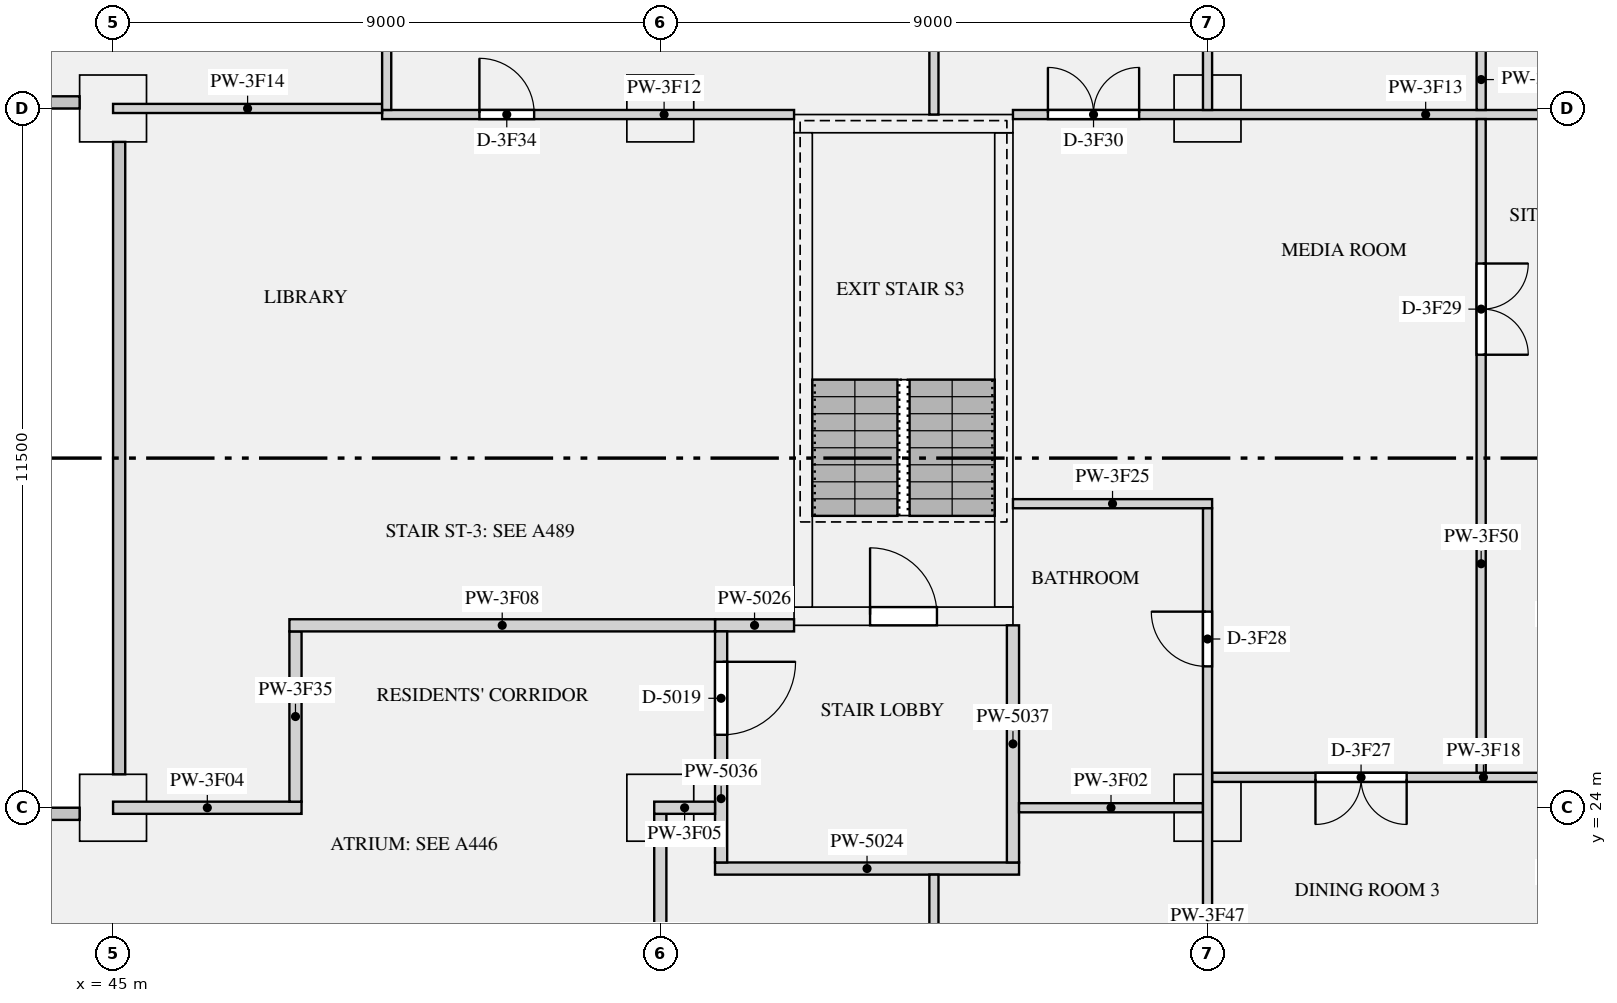
"""IFC4 building model, lengths in metres.
Left out: names, types, materials, properties, quantities, classifications, styles, units other than length and angle.
Written with IfcOpenShell. Run it as: python <this file> out.ifc"""

import sys

from ifc_helpers import new_model, si_unit, direction, frame, frame_2d, origin, origin_2d, place, context, subcontext, project, spatial, rectangle, extrude, element, fill, save


model = new_model("IFC4")
c1 = context("Model", 3, precision=1e-05, world=origin(), true_north=direction((0.0, 1.0)))
c2 = subcontext(c1, "Body", "Model", "MODEL_VIEW")
j1 = project(units=[si_unit("LENGTHUNIT", "METRE"), si_unit("PLANEANGLEUNIT", "RADIAN")], contexts=[c1])
p1 = place(None, origin())
s1 = spatial("IfcSite", under=j1, at=p1, CompositionType="ELEMENT")
p2 = place(p1, origin())
s2 = spatial("IfcBuilding", under=s1, at=p2, CompositionType="ELEMENT")
p3 = place(p2, frame((0.0, 0.0, 179.1)))
s3 = spatial("IfcBuildingStorey", under=s2, at=p3, CompositionType="ELEMENT", Elevation=179.1)
for number, where, z_axis, x_axis in (
    (1, (45.0, 24.0, 0.0), (0.0, 0.0, 1.0), (1.0, 0.0, 0.0)),
    (2, (54.0, 24.0, 0.0), (0.0, 0.0, 1.0), (1.0, 0.0, 0.0)),
    (3, (63.0, 24.0, 0.0), (0.0, 0.0, 1.0), (1.0, 0.0, 0.0)),
    (4, (45.0, 35.5, 0.0), (0.0, 0.0, 1.0), (1.0, 0.0, 0.0)),
    (5, (54.0, 35.5, 0.0), (0.0, 0.0, 1.0), (1.0, 0.0, 0.0)),
    (6, (63.0, 35.5, 0.0), (0.0, 0.0, 1.0), (1.0, 0.0, 0.0)),
):
    element("IfcColumn", number, at=place(p3, frame(where, z_axis=z_axis, x_axis=x_axis)), inside=s3, PredefinedType="COLUMN", context=c2, shape_type="SweptSolid", body=[
        extrude(rectangle(XDim=1.1, YDim=1.1, at=origin_2d()), origin(), (0.0, 0.0, 1.0), 3.15),
    ])
p4 = place(p3, frame((56.2, 27.15, 0.0), z_axis=(0.0, 0.0, 1.0), x_axis=(1.0, 0.0, 0.0)))
e7 = element("IfcWall", 7, at=p4, inside=s3, PredefinedType="SHEAR", context=c2, shape_type="SweptSolid", body=[
    extrude(rectangle(XDim=3.6, YDim=0.3, at=frame_2d((1.8, 0.0))), origin(), (0.0, 0.0, 1.0), 3.15),
])
p5 = place(p4, frame((1.25, 0.0, 0.0)))
e8 = element("IfcOpeningElement", 8, at=p5, cuts=e7, PredefinedType="OPENING", context=c2, shape_type="SweptSolid", body=[
    extrude(rectangle(XDim=1.1, YDim=2.1, at=frame_2d((0.55, 1.05))), frame((0.0, 0.16, 0.0), z_axis=(0.0, -1.0, 0.0), x_axis=(1.0, 0.0, 0.0)), (0.0, 0.0, 1.0), 0.32),
])
p6 = place(p3, frame((56.2, 35.25, 0.0), z_axis=(0.0, 0.0, 1.0), x_axis=(1.0, 0.0, 0.0)))
e9 = element("IfcWall", 9, at=p6, inside=s3, PredefinedType="SHEAR", context=c2, shape_type="SweptSolid", body=[
    extrude(rectangle(XDim=3.6, YDim=0.3, at=frame_2d((1.8, 0.0))), origin(), (0.0, 0.0, 1.0), 3.15),
])
for number, where, z_axis, x_axis in (
    (10, (56.35, 27.3, 0.0), (0.0, 0.0, 1.0), (0.0, 1.0, 0.0)),
    (11, (59.65, 27.3, 0.0), (0.0, 0.0, 1.0), (0.0, 1.0, 0.0)),
):
    element("IfcWall", number, at=place(p3, frame(where, z_axis=z_axis, x_axis=x_axis)), inside=s3, PredefinedType="SHEAR", context=c2, shape_type="SweptSolid", body=[
        extrude(rectangle(XDim=7.8, YDim=0.3, at=frame_2d((3.9, 0.0))), origin(), (0.0, 0.0, 1.0), 3.15),
    ])
p7 = place(p3, frame((54.9, 23.0, 0.0), z_axis=(0.0, 0.0, 1.0), x_axis=(1.0, 0.0, 0.0)))
e12 = element("IfcWall", 12, at=p7, inside=s3, PredefinedType="PARTITIONING", context=c2, shape_type="SweptSolid", body=[
    extrude(rectangle(XDim=5.0, YDim=0.2, at=frame_2d((2.5, 0.0))), origin(), (0.0, 0.0, 1.0), 2.83),
])
p8 = place(p3, frame((54.9, 27.0, 0.0), z_axis=(0.0, 0.0, 1.0), x_axis=(1.0, 0.0, 0.0)))
e13 = element("IfcWall", 13, at=p8, inside=s3, PredefinedType="PARTITIONING", context=c2, shape_type="SweptSolid", body=[
    extrude(rectangle(XDim=1.3, YDim=0.2, at=frame_2d((0.65, 0.0))), origin(), (0.0, 0.0, 1.0), 2.83),
])
p9 = place(p3, frame((55.0, 23.1, 0.0), z_axis=(0.0, 0.0, 1.0), x_axis=(0.0, 1.0, 0.0)))
e14 = element("IfcWall", 14, at=p9, inside=s3, PredefinedType="PARTITIONING", context=c2, shape_type="SweptSolid", body=[
    extrude(rectangle(XDim=3.8, YDim=0.2, at=frame_2d((1.9, 0.0))), origin(), (0.0, 0.0, 1.0), 2.83),
])
p10 = place(p9, frame((2.1, 0.0, 0.0)))
e15 = element("IfcOpeningElement", 15, at=p10, cuts=e14, PredefinedType="OPENING", context=c2, shape_type="SweptSolid", body=[
    extrude(rectangle(XDim=1.2, YDim=2.1, at=frame_2d((0.6, 1.05))), frame((0.0, 0.11, 0.0), z_axis=(0.0, -1.0, 0.0), x_axis=(1.0, 0.0, 0.0)), (0.0, 0.0, 1.0), 0.22),
])
p11 = place(p3, frame((59.8, 23.1, 0.0), z_axis=(0.0, 0.0, 1.0), x_axis=(0.0, 1.0, 0.0)))
e16 = element("IfcWall", 16, at=p11, inside=s3, PredefinedType="PARTITIONING", context=c2, shape_type="SweptSolid", body=[
    extrude(rectangle(XDim=3.9, YDim=0.2, at=frame_2d((1.95, 0.0))), origin(), (0.0, 0.0, 1.0), 2.83),
])
p12 = place(p3, frame((59.9, 24.0, 0.0), z_axis=(0.0, 0.0, 1.0), x_axis=(1.0, 0.0, 0.0)))
e17 = element("IfcWall", 17, at=p12, inside=s3, PredefinedType="PARTITIONING", context=c2, shape_type="SweptSolid", body=[
    extrude(rectangle(XDim=3.025, YDim=0.15, at=frame_2d((1.513, 0.0))), origin(), (0.0, 0.0, 1.0), 2.83),
])
p13 = place(p3, frame((45.0, 24.0, 0.0), z_axis=(0.0, 0.0, 1.0), x_axis=(1.0, 0.0, 0.0)))
e18 = element("IfcWall", 18, at=p13, inside=s3, PredefinedType="PARTITIONING", context=c2, shape_type="SweptSolid", body=[
    extrude(rectangle(XDim=3.1, YDim=0.2, at=frame_2d((1.55, 0.0))), origin(), (0.0, 0.0, 1.0), 2.83),
])
p14 = place(p3, frame((53.9, 24.0, 0.0), z_axis=(0.0, 0.0, 1.0), x_axis=(1.0, 0.0, 0.0)))
e19 = element("IfcWall", 19, at=p14, inside=s3, PredefinedType="PARTITIONING", context=c2, shape_type="SweptSolid", body=[
    extrude(rectangle(XDim=1.0, YDim=0.2, at=frame_2d((0.5, 0.0))), origin(), (0.0, 0.0, 1.0), 2.83),
])
p15 = place(p3, frame((47.9, 27.0, 0.0), z_axis=(0.0, 0.0, 1.0), x_axis=(1.0, 0.0, 0.0)))
e20 = element("IfcWall", 20, at=p15, inside=s3, PredefinedType="PARTITIONING", context=c2, shape_type="SweptSolid", body=[
    extrude(rectangle(XDim=7.0, YDim=0.2, at=frame_2d((3.5, 0.0))), origin(), (0.0, 0.0, 1.0), 2.83),
])
p16 = place(p3, frame((49.425, 35.4, 0.0), z_axis=(0.0, 0.0, 1.0), x_axis=(1.0, 0.0, 0.0)))
e21 = element("IfcWall", 21, at=p16, inside=s3, PredefinedType="PARTITIONING", context=c2, shape_type="SweptSolid", body=[
    extrude(rectangle(XDim=6.775, YDim=0.15, at=frame_2d((3.387, 0.0))), origin(), (0.0, 0.0, 1.0), 2.83),
])
p17 = place(p16, frame((1.6, 0.0, 0.0)))
e22 = element("IfcOpeningElement", 22, at=p17, cuts=e21, PredefinedType="OPENING", context=c2, shape_type="SweptSolid", body=[
    extrude(rectangle(XDim=0.9, YDim=2.1, at=frame_2d((0.45, 1.05))), frame((0.0, 0.085, 0.0), z_axis=(0.0, -1.0, 0.0), x_axis=(1.0, 0.0, 0.0)), (0.0, 0.0, 1.0), 0.17),
])
p18 = place(p3, frame((59.8, 35.4, 0.0), z_axis=(0.0, 0.0, 1.0), x_axis=(1.0, 0.0, 0.0)))
e23 = element("IfcWall", 23, at=p18, inside=s3, PredefinedType="PARTITIONING", context=c2, shape_type="SweptSolid", body=[
    extrude(rectangle(XDim=11.5, YDim=0.15, at=frame_2d((5.75, 0.0))), origin(), (0.0, 0.0, 1.0), 2.83),
])
p19 = place(p18, frame((0.575, 0.0, 0.0)))
e24 = element("IfcOpeningElement", 24, at=p19, cuts=e23, PredefinedType="OPENING", context=c2, shape_type="SweptSolid", body=[
    extrude(rectangle(XDim=1.5, YDim=2.1, at=frame_2d((0.75, 1.05))), frame((0.0, 0.085, 0.0), z_axis=(0.0, -1.0, 0.0), x_axis=(1.0, 0.0, 0.0)), (0.0, 0.0, 1.0), 0.17),
])
p20 = place(p3, frame((45.0, 35.5, 0.0), z_axis=(0.0, 0.0, 1.0), x_axis=(1.0, 0.0, 0.0)))
e25 = element("IfcWall", 25, at=p20, inside=s3, PredefinedType="PARTITIONING", context=c2, shape_type="SweptSolid", body=[
    extrude(rectangle(XDim=4.425, YDim=0.15, at=frame_2d((2.212, 0.0))), origin(), (0.0, 0.0, 1.0), 2.83),
])
p21 = place(p3, frame((63.075, 24.5, 0.0), z_axis=(0.0, 0.0, 1.0), x_axis=(1.0, 0.0, 0.0)))
e26 = element("IfcWall", 26, at=p21, inside=s3, PredefinedType="PARTITIONING", context=c2, shape_type="SweptSolid", body=[
    extrude(rectangle(XDim=5.725, YDim=0.15, at=frame_2d((2.863, 0.0))), origin(), (0.0, 0.0, 1.0), 2.83),
])
p22 = place(p21, frame((1.7, 0.0, 0.0)))
e27 = element("IfcOpeningElement", 27, at=p22, cuts=e26, PredefinedType="OPENING", context=c2, shape_type="SweptSolid", body=[
    extrude(rectangle(XDim=1.5, YDim=2.1, at=frame_2d((0.75, 1.05))), frame((0.0, 0.085, 0.0), z_axis=(0.0, -1.0, 0.0), x_axis=(1.0, 0.0, 0.0)), (0.0, 0.0, 1.0), 0.17),
])
p23 = place(p3, frame((59.8, 29.0, 0.0), z_axis=(0.0, 0.0, 1.0), x_axis=(1.0, 0.0, 0.0)))
e28 = element("IfcWall", 28, at=p23, inside=s3, PredefinedType="PARTITIONING", context=c2, shape_type="SweptSolid", body=[
    extrude(rectangle(XDim=3.275, YDim=0.15, at=frame_2d((1.637, 0.0))), origin(), (0.0, 0.0, 1.0), 2.83),
])
p24 = place(p3, frame((54.0, 16.1, 0.0), z_axis=(0.0, 0.0, 1.0), x_axis=(0.0, 1.0, 0.0)))
e29 = element("IfcWall", 29, at=p24, inside=s3, PredefinedType="PARTITIONING", context=c2, shape_type="SweptSolid", body=[
    extrude(rectangle(XDim=7.8, YDim=0.2, at=frame_2d((3.9, 0.0))), origin(), (0.0, 0.0, 1.0), 2.83),
])
p25 = place(p24, frame((1.85, 0.0, 0.0)))
e30 = element("IfcOpeningElement", 30, at=p25, cuts=e29, PredefinedType="OPENING", context=c2, shape_type="SweptSolid", body=[
    extrude(rectangle(XDim=1.1, YDim=2.1, at=frame_2d((0.55, 1.05))), frame((0.0, 0.11, 0.0), z_axis=(0.0, -1.0, 0.0), x_axis=(1.0, 0.0, 0.0)), (0.0, 0.0, 1.0), 0.22),
])
p26 = place(p3, frame((48.0, 24.1, 0.0), z_axis=(0.0, 0.0, 1.0), x_axis=(0.0, 1.0, 0.0)))
e31 = element("IfcWall", 31, at=p26, inside=s3, PredefinedType="PARTITIONING", context=c2, shape_type="SweptSolid", body=[
    extrude(rectangle(XDim=2.8, YDim=0.2, at=frame_2d((1.4, 0.0))), origin(), (0.0, 0.0, 1.0), 2.83),
])
p27 = place(p3, frame((58.5, 12.575, 0.0), z_axis=(0.0, 0.0, 1.0), x_axis=(0.0, 1.0, 0.0)))
e32 = element("IfcWall", 32, at=p27, inside=s3, PredefinedType="PARTITIONING", context=c2, shape_type="SweptSolid", body=[
    extrude(rectangle(XDim=10.325, YDim=0.15, at=frame_2d((5.163, 0.0))), origin(), (0.0, 0.0, 1.0), 2.83),
])
p28 = place(p27, frame((4.75, 0.0, 0.0)))
e33 = element("IfcOpeningElement", 33, at=p28, cuts=e32, PredefinedType="OPENING", context=c2, shape_type="SweptSolid", body=[
    extrude(rectangle(XDim=0.9, YDim=2.1, at=frame_2d((0.45, 1.05))), frame((0.0, 0.085, 0.0), z_axis=(0.0, -1.0, 0.0), x_axis=(1.0, 0.0, 0.0)), (0.0, 0.0, 1.0), 0.17),
])
p29 = place(p3, frame((58.5, 35.4, 0.0), z_axis=(0.0, 0.0, 1.0), x_axis=(0.0, 1.0, 0.0)))
e34 = element("IfcWall", 34, at=p29, inside=s3, PredefinedType="PARTITIONING", context=c2, shape_type="SweptSolid", body=[
    extrude(rectangle(XDim=7.4, YDim=0.15, at=frame_2d((3.7, 0.0))), origin(), (0.0, 0.0, 1.0), 2.83),
])
p30 = place(p29, frame((3.025, 0.0, 0.0)))
e35 = element("IfcOpeningElement", 35, at=p30, cuts=e34, PredefinedType="OPENING", context=c2, shape_type="SweptSolid", body=[
    extrude(rectangle(XDim=1.5, YDim=2.1, at=frame_2d((0.75, 1.05))), frame((0.0, 0.085, 0.0), z_axis=(0.0, -1.0, 0.0), x_axis=(1.0, 0.0, 0.0)), (0.0, 0.0, 1.0), 0.17),
])
p31 = place(p3, frame((63.0, 12.575, 0.0), z_axis=(0.0, 0.0, 1.0), x_axis=(0.0, 1.0, 0.0)))
e36 = element("IfcWall", 36, at=p31, inside=s3, PredefinedType="PARTITIONING", context=c2, shape_type="SweptSolid", body=[
    extrude(rectangle(XDim=16.35, YDim=0.15, at=frame_2d((8.175, 0.0))), origin(), (0.0, 0.0, 1.0), 2.83),
])
p32 = place(p31, frame((3.75, 0.0, 0.0)))
e37 = element("IfcOpeningElement", 37, at=p32, cuts=e36, PredefinedType="OPENING", context=c2, shape_type="SweptSolid", body=[
    extrude(rectangle(XDim=0.9, YDim=2.1, at=frame_2d((0.45, 1.05))), frame((0.0, 0.085, 0.0), z_axis=(0.0, -1.0, 0.0), x_axis=(1.0, 0.0, 0.0)), (0.0, 0.0, 1.0), 0.17),
])
p33 = place(p31, frame((13.75, 0.0, 0.0)))
e38 = element("IfcOpeningElement", 38, at=p33, cuts=e36, PredefinedType="OPENING", context=c2, shape_type="SweptSolid", body=[
    extrude(rectangle(XDim=0.9, YDim=2.1, at=frame_2d((0.45, 1.05))), frame((0.0, 0.085, 0.0), z_axis=(0.0, -1.0, 0.0), x_axis=(1.0, 0.0, 0.0)), (0.0, 0.0, 1.0), 0.17),
])
p34 = place(p3, frame((63.0, 35.475, 0.0), z_axis=(0.0, 0.0, 1.0), x_axis=(0.0, 1.0, 0.0)))
e39 = element("IfcWall", 39, at=p34, inside=s3, PredefinedType="PARTITIONING", context=c2, shape_type="SweptSolid", body=[
    extrude(rectangle(XDim=7.325, YDim=0.15, at=frame_2d((3.663, 0.0))), origin(), (0.0, 0.0, 1.0), 2.83),
])
p35 = place(p34, frame((3.575, 0.0, 0.0)))
e40 = element("IfcOpeningElement", 40, at=p35, cuts=e39, PredefinedType="OPENING", context=c2, shape_type="SweptSolid", body=[
    extrude(rectangle(XDim=0.9, YDim=2.1, at=frame_2d((0.45, 1.05))), frame((0.0, 0.085, 0.0), z_axis=(0.0, -1.0, 0.0), x_axis=(1.0, 0.0, 0.0)), (0.0, 0.0, 1.0), 0.17),
])
p36 = place(p3, frame((67.5, 24.575, 0.0), z_axis=(0.0, 0.0, 1.0), x_axis=(0.0, 1.0, 0.0)))
e41 = element("IfcWall", 41, at=p36, inside=s3, PredefinedType="PARTITIONING", context=c2, shape_type="SweptSolid", body=[
    extrude(rectangle(XDim=10.75, YDim=0.15, at=frame_2d((5.375, 0.0))), origin(), (0.0, 0.0, 1.0), 2.83),
])
p37 = place(p36, frame((6.875, 0.0, 0.0)))
e42 = element("IfcOpeningElement", 42, at=p37, cuts=e41, PredefinedType="OPENING", context=c2, shape_type="SweptSolid", body=[
    extrude(rectangle(XDim=1.5, YDim=2.1, at=frame_2d((0.75, 1.05))), frame((0.0, 0.085, 0.0), z_axis=(0.0, -1.0, 0.0), x_axis=(1.0, 0.0, 0.0)), (0.0, 0.0, 1.0), 0.17),
])
p38 = place(p3, frame((67.5, 35.475, 0.0), z_axis=(0.0, 0.0, 1.0), x_axis=(0.0, 1.0, 0.0)))
e43 = element("IfcWall", 43, at=p38, inside=s3, PredefinedType="PARTITIONING", context=c2, shape_type="SweptSolid", body=[
    extrude(rectangle(XDim=2.825, YDim=0.15, at=frame_2d((1.413, 0.0))), origin(), (0.0, 0.0, 1.0), 2.83),
])
p39 = place(p38, frame((1.0, 0.0, 0.0)))
e44 = element("IfcOpeningElement", 44, at=p39, cuts=e43, PredefinedType="OPENING", context=c2, shape_type="SweptSolid", body=[
    extrude(rectangle(XDim=0.9, YDim=2.1, at=frame_2d((0.45, 1.05))), frame((0.0, 0.085, 0.0), z_axis=(0.0, -1.0, 0.0), x_axis=(1.0, 0.0, 0.0)), (0.0, 0.0, 1.0), 0.17),
])
p40 = place(p3, frame((49.5, 35.475, 0.0), z_axis=(0.0, 0.0, 1.0), x_axis=(0.0, 1.0, 0.0)))
e45 = element("IfcWall", 45, at=p40, inside=s3, PredefinedType="PARTITIONING", context=c2, shape_type="SweptSolid", body=[
    extrude(rectangle(XDim=7.325, YDim=0.15, at=frame_2d((3.663, 0.0))), origin(), (0.0, 0.0, 1.0), 2.83),
])
p41 = place(p40, frame((3.0, 0.0, 0.0)))
e46 = element("IfcOpeningElement", 46, at=p41, cuts=e45, PredefinedType="OPENING", context=c2, shape_type="SweptSolid", body=[
    extrude(rectangle(XDim=1.5, YDim=2.1, at=frame_2d((0.75, 1.05))), frame((0.0, 0.085, 0.0), z_axis=(0.0, -1.0, 0.0), x_axis=(1.0, 0.0, 0.0)), (0.0, 0.0, 1.0), 0.17),
])
p42 = place(p5, origin())
e47 = element("IfcDoor", 47, at=p42, inside=s3, OperationType="SINGLE_SWING_LEFT", PredefinedType="DOOR", context=c2, shape_type="SweptSolid", body=[
    extrude(rectangle(XDim=1.1, YDim=2.1, at=frame_2d((0.55, 1.05))), frame((0.0, 0.025, 0.0), z_axis=(0.0, -1.0, 0.0), x_axis=(1.0, 0.0, 0.0)), (0.0, 0.0, 1.0), 0.05),
])
fill(e8, e47)
p43 = place(p10, frame((1.2, 0.0, 0.0), z_axis=(0.0, 0.0, 1.0), x_axis=(-1.0, 0.0, 0.0)))
e48 = element("IfcDoor", 48, at=p43, inside=s3, OperationType="SINGLE_SWING_LEFT", PredefinedType="DOOR", context=c2, shape_type="SweptSolid", body=[
    extrude(rectangle(XDim=1.2, YDim=2.1, at=frame_2d((0.6, 1.05))), frame((0.0, 0.025, 0.0), z_axis=(0.0, -1.0, 0.0), x_axis=(1.0, 0.0, 0.0)), (0.0, 0.0, 1.0), 0.05),
])
fill(e15, e48)
p44 = place(p22, frame((1.5, 0.0, 0.0), z_axis=(0.0, 0.0, 1.0), x_axis=(-1.0, 0.0, 0.0)))
e49 = element("IfcDoor", 49, at=p44, inside=s3, OperationType="DOUBLE_DOOR_SINGLE_SWING", PredefinedType="DOOR", context=c2, shape_type="SweptSolid", body=[
    extrude(rectangle(XDim=1.5, YDim=2.1, at=frame_2d((0.75, 1.05))), frame((0.0, 0.025, 0.0), z_axis=(0.0, -1.0, 0.0), x_axis=(1.0, 0.0, 0.0)), (0.0, 0.0, 1.0), 0.05),
])
fill(e27, e49)
p45 = place(p33, origin())
e50 = element("IfcDoor", 50, at=p45, inside=s3, OperationType="SINGLE_SWING_RIGHT", PredefinedType="DOOR", context=c2, shape_type="SweptSolid", body=[
    extrude(rectangle(XDim=0.9, YDim=2.1, at=frame_2d((0.45, 1.05))), frame((0.0, 0.025, 0.0), z_axis=(0.0, -1.0, 0.0), x_axis=(1.0, 0.0, 0.0)), (0.0, 0.0, 1.0), 0.05),
])
fill(e38, e50)
p46 = place(p37, frame((1.5, 0.0, 0.0), z_axis=(0.0, 0.0, 1.0), x_axis=(-1.0, 0.0, 0.0)))
e51 = element("IfcDoor", 51, at=p46, inside=s3, OperationType="DOUBLE_DOOR_SINGLE_SWING", PredefinedType="DOOR", context=c2, shape_type="SweptSolid", body=[
    extrude(rectangle(XDim=1.5, YDim=2.1, at=frame_2d((0.75, 1.05))), frame((0.0, 0.025, 0.0), z_axis=(0.0, -1.0, 0.0), x_axis=(1.0, 0.0, 0.0)), (0.0, 0.0, 1.0), 0.05),
])
fill(e42, e51)
p47 = place(p19, origin())
e52 = element("IfcDoor", 52, at=p47, inside=s3, OperationType="DOUBLE_DOOR_SINGLE_SWING", PredefinedType="DOOR", context=c2, shape_type="SweptSolid", body=[
    extrude(rectangle(XDim=1.5, YDim=2.1, at=frame_2d((0.75, 1.05))), frame((0.0, 0.025, 0.0), z_axis=(0.0, -1.0, 0.0), x_axis=(1.0, 0.0, 0.0)), (0.0, 0.0, 1.0), 0.05),
])
fill(e24, e52)
p48 = place(p17, origin())
e53 = element("IfcDoor", 53, at=p48, inside=s3, OperationType="SINGLE_SWING_LEFT", PredefinedType="DOOR", context=c2, shape_type="SweptSolid", body=[
    extrude(rectangle(XDim=0.9, YDim=2.1, at=frame_2d((0.45, 1.05))), frame((0.0, 0.025, 0.0), z_axis=(0.0, -1.0, 0.0), x_axis=(1.0, 0.0, 0.0)), (0.0, 0.0, 1.0), 0.05),
])
fill(e22, e53)
save(model, sys.argv[1])
